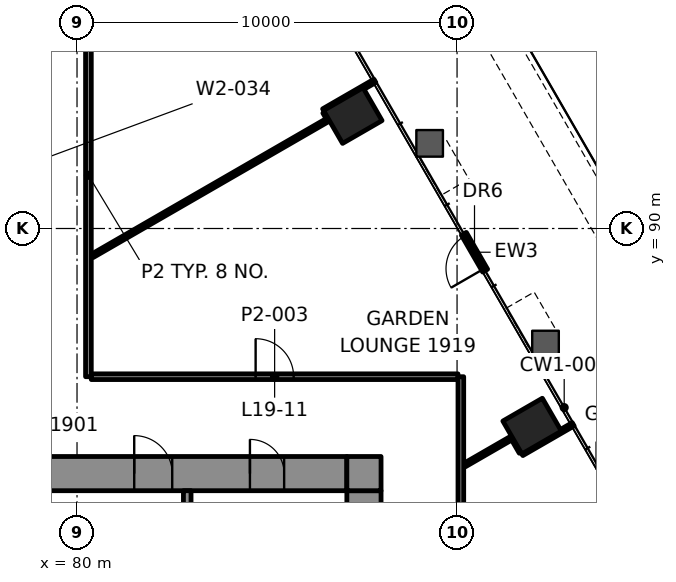
"""IFC4 building model, lengths in metres.
Left out: names, types, materials, properties, quantities, classifications, styles, units other than length and angle.
Written with IfcOpenShell. Run it as: python <this file> out.ifc"""

import sys

from ifc_helpers import new_model, si_unit, direction, frame, frame_2d, origin, origin_2d, place, context, subcontext, project, spatial, rectangle, extrude, element, fill, save


model = new_model("IFC4")
c1 = context("Model", 3, precision=1e-05, world=origin(), true_north=direction((0.0, 1.0)))
c2 = subcontext(c1, "Body", "Model", "MODEL_VIEW")
j1 = project(units=[si_unit("LENGTHUNIT", "METRE"), si_unit("PLANEANGLEUNIT", "RADIAN")], contexts=[c1])
p1 = place(None, origin())
s1 = spatial("IfcSite", under=j1, at=p1, CompositionType="ELEMENT")
p2 = place(p1, origin())
s2 = spatial("IfcBuilding", under=s1, at=p2, CompositionType="ELEMENT")
p3 = place(p2, frame((0.0, 0.0, 86.2)))
s3 = spatial("IfcBuildingStorey", under=s2, at=p3, CompositionType="ELEMENT", Elevation=86.2)
for number, where, z_axis, x_axis in (
    (1, (91.975, 84.8, -0.0), (0.0, 0.0, 1.0), (-0.5, 0.866, 0.0)),
    (2, (87.257, 92.972, -0.0), (0.0, 0.0, 1.0), (-0.5, 0.866, 0.0)),
):
    element("IfcColumn", number, at=place(p3, frame(where, z_axis=z_axis, x_axis=x_axis)), inside=s3, PredefinedType="COLUMN", context=c2, shape_type="SweptSolid", body=[
        extrude(rectangle(XDim=1.0, YDim=1.2, at=origin_2d()), origin(), (0.0, 0.0, 1.0), 4.2),
    ])
p4 = place(p3, frame((62.0, 83.55, 0.0), z_axis=(0.0, 0.0, 1.0), x_axis=(1.0, 0.0, 0.0)))
e3 = element("IfcWall", 3, at=p4, inside=s3, PredefinedType="SHEAR", context=c2, shape_type="SweptSolid", body=[
    extrude(rectangle(XDim=25.1, YDim=0.9, at=frame_2d((12.55, 0.0))), origin(), (0.0, 0.0, 1.0), 4.0),
])
p5 = place(p4, frame((5.695, 0.0, 0.0)))
e4 = element("IfcOpeningElement", 4, at=p5, cuts=e3, PredefinedType="OPENING", context=c2, shape_type="SweptSolid", body=[
    extrude(rectangle(XDim=1.0, YDim=2.1, at=frame_2d((0.5, 1.05))), frame((0.0, 0.46, 0.0), z_axis=(0.0, -1.0, 0.0), x_axis=(1.0, 0.0, 0.0)), (0.0, 0.0, 1.0), 0.92),
])
p6 = place(p4, frame((19.505, 0.0, 0.0)))
e5 = element("IfcOpeningElement", 5, at=p6, cuts=e3, PredefinedType="OPENING", context=c2, shape_type="SweptSolid", body=[
    extrude(rectangle(XDim=1.0, YDim=2.1, at=frame_2d((0.5, 1.05))), frame((0.0, 0.46, 0.0), z_axis=(0.0, -1.0, 0.0), x_axis=(1.0, 0.0, 0.0)), (0.0, 0.0, 1.0), 0.92),
])
p7 = place(p4, frame((3.45, 0.0, 0.0)))
e6 = element("IfcOpeningElement", 6, at=p7, cuts=e3, PredefinedType="OPENING", context=c2, shape_type="SweptSolid", body=[
    extrude(rectangle(XDim=0.9, YDim=2.1, at=frame_2d((0.45, 1.05))), frame((0.0, 0.46, 0.0), z_axis=(0.0, -1.0, 0.0), x_axis=(1.0, 0.0, 0.0)), (0.0, 0.0, 1.0), 0.92),
])
p8 = place(p4, frame((12.65, 0.0, 0.0)))
e7 = element("IfcOpeningElement", 7, at=p8, cuts=e3, PredefinedType="OPENING", context=c2, shape_type="SweptSolid", body=[
    extrude(rectangle(XDim=0.9, YDim=2.1, at=frame_2d((0.45, 1.05))), frame((0.0, 0.46, 0.0), z_axis=(0.0, -1.0, 0.0), x_axis=(1.0, 0.0, 0.0)), (0.0, 0.0, 1.0), 0.92),
])
p9 = place(p4, frame((22.55, 0.0, 0.0)))
e8 = element("IfcOpeningElement", 8, at=p9, cuts=e3, PredefinedType="OPENING", context=c2, shape_type="SweptSolid", body=[
    extrude(rectangle(XDim=0.9, YDim=2.1, at=frame_2d((0.45, 1.05))), frame((0.0, 0.46, 0.0), z_axis=(0.0, -1.0, 0.0), x_axis=(1.0, 0.0, 0.0)), (0.0, 0.0, 1.0), 0.92),
])
p10 = place(p3, frame((87.55, 66.9, 0.0), z_axis=(0.0, 0.0, 1.0), x_axis=(0.0, 1.0, 0.0)))
e9 = element("IfcWall", 9, at=p10, inside=s3, PredefinedType="SHEAR", context=c2, shape_type="SweptSolid", body=[
    extrude(rectangle(XDim=16.2, YDim=0.9, at=frame_2d((8.1, 0.0))), origin(), (0.0, 0.0, 1.0), 4.0),
])
p11 = place(p10, frame((5.5, 0.0, 0.0)))
e10 = element("IfcOpeningElement", 10, at=p11, cuts=e9, PredefinedType="OPENING", context=c2, shape_type="SweptSolid", body=[
    extrude(rectangle(XDim=1.8, YDim=2.1, at=frame_2d((0.9, 1.05))), frame((0.0, 0.46, 0.0), z_axis=(0.0, -1.0, 0.0), x_axis=(1.0, 0.0, 0.0)), (0.0, 0.0, 1.0), 0.92),
])
p12 = place(p10, frame((11.738, 0.0, 0.0)))
e11 = element("IfcOpeningElement", 11, at=p12, cuts=e9, PredefinedType="OPENING", context=c2, shape_type="SweptSolid", body=[
    extrude(rectangle(XDim=0.9, YDim=2.1, at=frame_2d((0.45, 1.05))), frame((0.0, 0.46, 0.0), z_axis=(0.0, -1.0, 0.0), x_axis=(1.0, 0.0, 0.0)), (0.0, 0.0, 1.0), 0.92),
])
p13 = place(p3, frame((87.1, 83.55, 0.0), z_axis=(0.0, 0.0, 1.0), x_axis=(1.0, 0.0, 0.0)))
e12 = element("IfcWall", 12, at=p13, inside=s3, PredefinedType="SHEAR", context=c2, shape_type="SweptSolid", body=[
    extrude(rectangle(XDim=0.9, YDim=0.9, at=frame_2d((0.45, 0.0))), origin(), (0.0, 0.0, 1.0), 4.0),
])
p14 = place(p3, frame((80.375, 86.1, 0.0), z_axis=(0.0, 0.0, 1.0), x_axis=(1.0, 0.0, 0.0)))
e13 = element("IfcWall", 13, at=p14, inside=s3, PredefinedType="PARTITIONING", context=c2, shape_type="SweptSolid", body=[
    extrude(rectangle(XDim=9.649, YDim=0.15, at=frame_2d((4.825, 0.0))), origin(), (0.0, 0.0, 1.0), 3.4),
])
p15 = place(p14, frame((4.325, 0.0, 0.0)))
e14 = element("IfcOpeningElement", 14, at=p15, cuts=e13, PredefinedType="OPENING", context=c2, shape_type="SweptSolid", body=[
    extrude(rectangle(XDim=1.0, YDim=2.1, at=frame_2d((0.5, 1.05))), frame((0.0, 0.085, 0.0), z_axis=(0.0, -1.0, 0.0), x_axis=(1.0, 0.0, 0.0)), (0.0, 0.0, 1.0), 0.17),
])
p16 = place(p3, frame((91.706, 84.068, 0.0), z_axis=(0.0, 0.0, 1.0), x_axis=(0.866018739521, 0.500011542666, 0.0)))
e15 = element("IfcWall", 15, at=p16, inside=s3, PredefinedType="PARTITIONING", context=c2, shape_type="SweptSolid", body=[
    extrude(rectangle(XDim=1.56, YDim=0.1, at=frame_2d((0.78, 0.0))), origin(), (0.0, 0.0, 1.0), 3.165),
])
p17 = place(p3, frame((90.201, 83.776, 0.0), z_axis=(0.0, 0.0, 1.0), x_axis=(0.866003030001, 0.500038750527, 0.0)))
e16 = element("IfcWall", 16, at=p17, inside=s3, PredefinedType="PARTITIONING", context=c2, shape_type="SweptSolid", body=[
    extrude(rectangle(XDim=1.448, YDim=0.1, at=frame_2d((0.724, 0.0))), origin(), (0.0, 0.0, 1.0), 3.4),
])
p18 = place(p3, frame((80.401, 89.28, 0.0), z_axis=(0.0, 0.0, 1.0), x_axis=(0.866017489163, 0.500013708276, 0.0)))
e17 = element("IfcWall", 17, at=p18, inside=s3, PredefinedType="PARTITIONING", context=c2, shape_type="SweptSolid", body=[
    extrude(rectangle(XDim=7.183, YDim=0.1, at=frame_2d((3.592, 0.0))), origin(), (0.0, 0.0, 1.0), 3.4),
])
p19 = place(p3, frame((86.488, 93.105, 0.0), z_axis=(0.0, 0.0, 1.0), x_axis=(0.866018739521, 0.500011542666, 0.0)))
e18 = element("IfcWall", 18, at=p19, inside=s3, PredefinedType="PARTITIONING", context=c2, shape_type="SweptSolid", body=[
    extrude(rectangle(XDim=1.56, YDim=0.1, at=frame_2d((0.78, 0.0))), origin(), (0.0, 0.0, 1.0), 3.165),
])
p20 = place(p3, frame((90.1, 86.1, 0.0), z_axis=(0.0, 0.0, 1.0), x_axis=(0.0, -1.0, 0.0)))
e19 = element("IfcWall", 19, at=p20, inside=s3, PredefinedType="PARTITIONING", context=c2, shape_type="SweptSolid", body=[
    extrude(rectangle(XDim=18.778, YDim=0.15, at=frame_2d((9.389, 0.0))), origin(), (0.0, 0.0, 1.0), 3.4),
])
p21 = place(p20, frame((7.462, 0.0, 0.0)))
e20 = element("IfcOpeningElement", 20, at=p21, cuts=e19, PredefinedType="OPENING", context=c2, shape_type="SweptSolid", body=[
    extrude(rectangle(XDim=1.0, YDim=2.1, at=frame_2d((0.5, 1.05))), frame((0.0, 0.085, 0.0), z_axis=(0.0, -1.0, 0.0), x_axis=(1.0, 0.0, 0.0)), (0.0, 0.0, 1.0), 0.17),
])
p22 = place(p20, frame((15.559, 0.0, 0.0)))
e21 = element("IfcOpeningElement", 21, at=p22, cuts=e19, PredefinedType="OPENING", context=c2, shape_type="SweptSolid", body=[
    extrude(rectangle(XDim=1.0, YDim=2.1, at=frame_2d((0.5, 1.05))), frame((0.0, 0.085, 0.0), z_axis=(0.0, -1.0, 0.0), x_axis=(1.0, 0.0, 0.0)), (0.0, 0.0, 1.0), 0.17),
])
p23 = place(p3, frame((80.3, 86.1, 0.0), z_axis=(0.0, 0.0, 1.0), x_axis=(0.0, 1.0, 0.0)))
e22 = element("IfcWall", 22, at=p23, inside=s3, PredefinedType="PARTITIONING", context=c2, shape_type="SweptSolid", body=[
    extrude(rectangle(XDim=10.599, YDim=0.15, at=frame_2d((5.3, 0.0))), origin(), (0.0, 0.0, 1.0), 3.322),
])
p24 = place(p3, frame((91.68, 84.111, 0.0), z_axis=(0.0, 0.0, 1.0), x_axis=(-0.50002266109, 0.866012320003, 0.0)))
e23 = element("IfcWall", 23, at=p24, inside=s3, PredefinedType="PARTITIONING", context=c2, shape_type="SweptSolid", body=[
    extrude(rectangle(XDim=0.399, YDim=0.1, at=frame_2d((0.199, 0.0))), origin(), (0.0, 0.0, 1.0), 3.4),
])
p25 = place(p3, frame((86.597, 92.915, 0.0), z_axis=(0.0, 0.0, 1.0), x_axis=(-0.500013496215, 0.866017611601, 0.0)))
e24 = element("IfcWall", 24, at=p25, inside=s3, PredefinedType="PARTITIONING", context=c2, shape_type="SweptSolid", body=[
    extrude(rectangle(XDim=0.169, YDim=0.1, at=frame_2d((0.085, 0.0))), origin(), (0.0, 0.0, 1.0), 3.4),
])
p26 = place(p3, frame((94.539, 89.06, 0.0), z_axis=(0.0, 0.0, 1.0), x_axis=(-0.499999217398, 0.866025855619, 0.0)))
e25 = element("IfcWall", 25, at=p26, inside=s3, PredefinedType="SOLIDWALL", context=c2, shape_type="SweptSolid", body=[
    extrude(rectangle(XDim=27.311, YDim=0.8, at=frame_2d((13.656, 0.0))), origin(), (0.0, 0.0, 1.0), 0.9),
])
p27 = place(p3, frame((82.9, 81.28, 0.0), z_axis=(0.0, 0.0, 1.0), x_axis=(0.0, 1.0, 0.0)))
e26 = element("IfcWall", 26, at=p27, inside=s3, PredefinedType="PARTITIONING", context=c2, shape_type="SweptSolid", body=[
    extrude(rectangle(XDim=1.82, YDim=0.2, at=frame_2d((0.91, 0.0))), origin(), (0.0, 0.0, 1.0), 4.0),
])
p28 = place(p15, origin())
e27 = element("IfcDoor", 27, at=p28, inside=s3, OperationType="SINGLE_SWING_RIGHT", PredefinedType="DOOR", context=c2, shape_type="SweptSolid", body=[
    extrude(rectangle(XDim=1.0, YDim=2.1, at=frame_2d((0.5, 1.05))), frame((0.0, 0.025, 0.0), z_axis=(0.0, -1.0, 0.0), x_axis=(1.0, 0.0, 0.0)), (0.0, 0.0, 1.0), 0.05),
])
fill(e14, e27)
p29 = place(p3, frame((90.739, 88.891, 0.0), z_axis=(0.0, 0.0, 1.0), x_axis=(-0.500030632641, 0.866007717299, 0.0)))
p30 = place(p29, frame((0.06, 0.0, 0.0)))
p31 = place(p30, origin())
e28 = element("IfcDoor", 28, at=p31, inside=s3, OperationType="SINGLE_SWING_LEFT", PredefinedType="DOOR", context=c2, shape_type="SweptSolid", body=[
    extrude(rectangle(XDim=1.0, YDim=2.1, at=frame_2d((0.5, 1.05))), frame((0.0, 0.025, 0.0), z_axis=(0.0, -1.0, 0.0), x_axis=(1.0, 0.0, 0.0)), (0.0, 0.0, 1.0), 0.05),
])
p32 = place(p6, origin())
e29 = element("IfcDoor", 29, at=p32, inside=s3, OperationType="SINGLE_SWING_LEFT", PredefinedType="DOOR", context=c2, shape_type="SweptSolid", body=[
    extrude(rectangle(XDim=1.0, YDim=2.1, at=frame_2d((0.5, 1.05))), frame((0.0, 0.17, 0.0), z_axis=(0.0, -1.0, 0.0), x_axis=(1.0, 0.0, 0.0)), (0.0, 0.0, 1.0), 0.34),
])
fill(e5, e29)
p33 = place(p9, origin())
e30 = element("IfcDoor", 30, at=p33, inside=s3, OperationType="SINGLE_SWING_LEFT", PredefinedType="DOOR", context=c2, shape_type="SweptSolid", body=[
    extrude(rectangle(XDim=0.9, YDim=2.1, at=frame_2d((0.45, 1.05))), frame((0.0, 0.17, 0.0), z_axis=(0.0, -1.0, 0.0), x_axis=(1.0, 0.0, 0.0)), (0.0, 0.0, 1.0), 0.34),
])
fill(e8, e30)
save(model, sys.argv[1])
